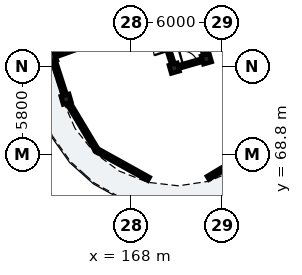
"""IFC4 building model, lengths in metres.
Left out: names, types, materials, properties, quantities, classifications, styles, units other than length and angle.
Written with IfcOpenShell. Run it as: python <this file> out.ifc"""

import sys

from ifc_helpers import new_model, si_unit, direction, frame, frame_2d, origin, origin_2d, place, context, subcontext, project, spatial, rectangle, extrude, element, fill, save


model = new_model("IFC4")
c1 = context("Model", 3, precision=1e-05, world=origin(), true_north=direction((0.0, 1.0)))
c2 = subcontext(c1, "Body", "Model", "MODEL_VIEW")
j1 = project(units=[si_unit("LENGTHUNIT", "METRE"), si_unit("PLANEANGLEUNIT", "RADIAN")], contexts=[c1])
p1 = place(None, origin())
s1 = spatial("IfcSite", under=j1, at=p1, CompositionType="ELEMENT")
p2 = place(p1, origin())
s2 = spatial("IfcBuilding", under=s1, at=p2, CompositionType="ELEMENT")
p3 = place(p2, frame((0.0, 0.0, 12.2)))
s3 = spatial("IfcBuildingStorey", under=s2, at=p3, CompositionType="ELEMENT", Elevation=12.2)
for number, where, z_axis, x_axis in (
    (1, (163.728, 72.452, 0.0), (0.0, 0.0, 1.0), (0.961, 0.276, 0.0)),
    (2, (170.841, 74.492, 0.0), (0.0, 0.0, 1.0), (0.961, 0.276, 0.0)),
    (3, (172.956, 75.098, 0.0), (0.0, 0.0, 1.0), (0.961, 0.276, 0.0)),
):
    element("IfcColumn", number, at=place(p3, frame(where, z_axis=z_axis, x_axis=x_axis)), inside=s3, PredefinedType="COLUMN", context=c2, shape_type="SweptSolid", body=[
        extrude(rectangle(XDim=0.55, YDim=0.55, at=origin_2d()), origin(), (0.0, 0.0, 1.0), 3.105),
    ])
p4 = place(p3, frame((162.828, 75.241, 0.0), z_axis=(0.0, 0.0, 1.0), x_axis=(0.941012076693, 0.338372976931, 0.0)))
e4 = element("IfcColumn", 4, at=p4, inside=s3, PredefinedType="PILASTER", context=c2, shape_type="SweptSolid", body=[
    extrude(rectangle(XDim=0.38, YDim=0.62, at=origin_2d()), origin(), (0.0, 0.0, 1.0), 3.105),
])
p5 = place(p3, frame((163.653, 72.685, 0.0), z_axis=(0.0, 0.0, 1.0), x_axis=(-0.30716379336, 0.951656662903, 0.0)))
e5 = element("IfcWall", 5, at=p5, inside=s3, PredefinedType="SOLIDWALL", context=c2, shape_type="SweptSolid", body=[
    extrude(rectangle(XDim=2.525, YDim=0.24, at=frame_2d((1.263, 0.0))), origin(), (0.0, 0.0, 1.0), 2.355),
])
p6 = place(p5, frame((0.673, 0.0, 0.55)))
e6 = element("IfcOpeningElement", 6, at=p6, cuts=e5, PredefinedType="OPENING", context=c2, shape_type="SweptSolid", body=[
    extrude(rectangle(XDim=1.18, YDim=1.48, at=frame_2d((0.59, 0.74))), frame((0.0, 0.13, 0.0), z_axis=(0.0, -1.0, 0.0), x_axis=(1.0, 0.0, 0.0)), (0.0, 0.0, 1.0), 0.26),
])
p7 = place(p3, frame((162.769, 75.389, 0.0), z_axis=(0.0, 0.0, 1.0), x_axis=(-0.369122600107, 0.92938071106, 0.0)))
e7 = element("IfcWall", 7, at=p7, inside=s3, PredefinedType="SOLIDWALL", context=c2, shape_type="SweptSolid", body=[
    extrude(rectangle(XDim=2.525, YDim=0.24, at=frame_2d((1.263, 0.0))), origin(), (0.0, 0.0, 1.0), 2.355),
])
p8 = place(p7, frame((0.523, 0.0, 0.55)))
e8 = element("IfcOpeningElement", 8, at=p8, cuts=e7, PredefinedType="OPENING", context=c2, shape_type="SweptSolid", body=[
    extrude(rectangle(XDim=1.48, YDim=1.62, at=frame_2d((0.74, 0.81))), frame((0.0, 0.13, 0.0), z_axis=(0.0, -1.0, 0.0), x_axis=(1.0, 0.0, 0.0)), (0.0, 0.0, 1.0), 0.26),
])
p9 = place(p3, frame((176.417, 69.289, 0.0), z_axis=(0.0, 0.0, 1.0), x_axis=(-0.85715098885, -0.515065221417, 0.0)))
e9 = element("IfcWall", 9, at=p9, inside=s3, PredefinedType="SOLIDWALL", context=c2, shape_type="SweptSolid", body=[
    extrude(rectangle(XDim=3.908, YDim=0.24, at=frame_2d((1.954, 0.0))), origin(), (0.0, 0.0, 1.0), 2.355),
])
p10 = place(p9, frame((1.029, 0.0, 0.4)))
e10 = element("IfcOpeningElement", 10, at=p10, cuts=e9, PredefinedType="OPENING", context=c2, shape_type="SweptSolid", body=[
    extrude(rectangle(XDim=1.85, YDim=1.72, at=frame_2d((0.925, 0.86))), frame((0.0, 0.13, 0.0), z_axis=(0.0, -1.0, 0.0), x_axis=(1.0, 0.0, 0.0)), (0.0, 0.0, 1.0), 0.26),
])
p11 = place(p3, frame((169.159, 67.208, 0.0), z_axis=(0.0, 0.0, 1.0), x_axis=(-0.874643043537, 0.484767517881, 0.0)))
e11 = element("IfcWall", 11, at=p11, inside=s3, PredefinedType="SOLIDWALL", context=c2, shape_type="SweptSolid", body=[
    extrude(rectangle(XDim=3.908, YDim=0.24, at=frame_2d((1.954, 0.0))), origin(), (0.0, 0.0, 1.0), 2.355),
])
p12 = place(p3, frame((165.741, 69.102, 0.0), z_axis=(0.0, 0.0, 1.0), x_axis=(-0.515037642827, 0.857167560324, 0.0)))
e12 = element("IfcWall", 12, at=p12, inside=s3, PredefinedType="SOLIDWALL", context=c2, shape_type="SweptSolid", body=[
    extrude(rectangle(XDim=3.908, YDim=0.24, at=frame_2d((1.954, 0.0))), origin(), (0.0, 0.0, 1.0), 2.355),
])
p13 = place(p12, frame((1.029, 0.0, 0.4)))
e13 = element("IfcOpeningElement", 13, at=p13, cuts=e12, PredefinedType="OPENING", context=c2, shape_type="SweptSolid", body=[
    extrude(rectangle(XDim=1.85, YDim=1.72, at=frame_2d((0.925, 0.86))), frame((0.0, 0.13, 0.0), z_axis=(0.0, -1.0, 0.0), x_axis=(1.0, 0.0, 0.0)), (0.0, 0.0, 1.0), 0.26),
])
p14 = place(p3, frame((172.849, 75.431, 0.0), z_axis=(0.0, 0.0, 1.0), x_axis=(-0.307157249761, 0.951658774939, 0.0)))
e14 = element("IfcWall", 14, at=p14, inside=s3, PredefinedType="PARTITIONING", context=c2, shape_type="SweptSolid", body=[
    extrude(rectangle(XDim=2.863, YDim=0.205, at=frame_2d((1.432, 0.0))), origin(), (0.0, 0.0, 1.0), 2.37),
])
p15 = place(p14, frame((0.937, 0.0, 0.0)))
e15 = element("IfcOpeningElement", 15, at=p15, cuts=e14, PredefinedType="OPENING", context=c2, shape_type="SweptSolid", body=[
    extrude(rectangle(XDim=0.99, YDim=2.16, at=frame_2d((0.495, 1.08))), frame((0.0, 0.113, 0.0), z_axis=(0.0, -1.0, 0.0), x_axis=(1.0, 0.0, 0.0)), (0.0, 0.0, 1.0), 0.225),
])
p16 = place(p3, frame((170.734, 74.825, 0.0), z_axis=(0.0, 0.0, 1.0), x_axis=(-0.307186478934, 0.95164934044, 0.0)))
e16 = element("IfcWall", 16, at=p16, inside=s3, PredefinedType="PARTITIONING", context=c2, shape_type="SweptSolid", body=[
    extrude(rectangle(XDim=2.718, YDim=0.205, at=frame_2d((1.359, 0.0))), origin(), (0.0, 0.0, 1.0), 2.37),
])
p17 = place(p16, frame((0.864, 0.0, 0.0)))
e17 = element("IfcOpeningElement", 17, at=p17, cuts=e16, PredefinedType="OPENING", context=c2, shape_type="SweptSolid", body=[
    extrude(rectangle(XDim=0.99, YDim=2.16, at=frame_2d((0.495, 1.08))), frame((0.0, 0.113, 0.0), z_axis=(0.0, -1.0, 0.0), x_axis=(1.0, 0.0, 0.0)), (0.0, 0.0, 1.0), 0.225),
])
p18 = place(p3, frame((163.204, 75.376, 0.0), z_axis=(0.0, 0.0, 1.0), x_axis=(0.941005714099, 0.338390670725, 0.0)))
e18 = element("IfcWall", 18, at=p18, inside=s3, PredefinedType="PARTITIONING", context=c2, shape_type="SweptSolid", body=[
    extrude(rectangle(XDim=6.6, YDim=0.185, at=frame_2d((3.3, 0.0))), origin(), (0.0, 0.0, 1.0), 2.37),
])
p19 = place(p3, frame((170.889, 74.506, 0.0), z_axis=(0.0, 0.0, 1.0), x_axis=(0.961264701934, 0.275626872449, 0.0)))
e19 = element("IfcWall", 19, at=p19, inside=s3, PredefinedType="PARTITIONING", context=c2, shape_type="SweptSolid", body=[
    extrude(rectangle(XDim=2.1, YDim=0.205, at=frame_2d((1.05, 0.0))), origin(), (0.0, 0.0, 1.0), 2.37),
])
p20 = place(p19, frame((0.57, 0.0, 0.0)))
e20 = element("IfcOpeningElement", 20, at=p20, cuts=e19, PredefinedType="OPENING", context=c2, shape_type="SweptSolid", body=[
    extrude(rectangle(XDim=0.95, YDim=2.13, at=frame_2d((0.475, 1.065))), frame((0.0, 0.113, 0.0), z_axis=(0.0, -1.0, 0.0), x_axis=(1.0, 0.0, 0.0)), (0.0, 0.0, 1.0), 0.225),
])
p21 = place(p6, origin())
e21 = element("IfcWindow", 21, at=p21, inside=s3, PartitioningType="SINGLE_PANEL", PredefinedType="WINDOW", context=c2, shape_type="SweptSolid", body=[
    extrude(rectangle(XDim=1.18, YDim=1.48, at=frame_2d((0.59, 0.74))), frame((0.0, 0.03, 0.0), z_axis=(0.0, -1.0, 0.0), x_axis=(1.0, 0.0, 0.0)), (0.0, 0.0, 1.0), 0.06),
])
fill(e6, e21)
p22 = place(p10, origin())
e22 = element("IfcWindow", 22, at=p22, inside=s3, PartitioningType="SINGLE_PANEL", PredefinedType="WINDOW", context=c2, shape_type="SweptSolid", body=[
    extrude(rectangle(XDim=1.85, YDim=1.72, at=frame_2d((0.925, 0.86))), frame((0.0, 0.03, 0.0), z_axis=(0.0, -1.0, 0.0), x_axis=(1.0, 0.0, 0.0)), (0.0, 0.0, 1.0), 0.06),
])
fill(e10, e22)
p23 = place(p13, origin())
e23 = element("IfcWindow", 23, at=p23, inside=s3, PartitioningType="SINGLE_PANEL", PredefinedType="WINDOW", context=c2, shape_type="SweptSolid", body=[
    extrude(rectangle(XDim=1.85, YDim=1.72, at=frame_2d((0.925, 0.86))), frame((0.0, 0.03, 0.0), z_axis=(0.0, -1.0, 0.0), x_axis=(1.0, 0.0, 0.0)), (0.0, 0.0, 1.0), 0.06),
])
fill(e13, e23)
p24 = place(p20, origin())
e24 = element("IfcDoor", 24, at=p24, inside=s3, OperationType="SINGLE_SWING_LEFT", PredefinedType="DOOR", context=c2, shape_type="SweptSolid", body=[
    extrude(rectangle(XDim=0.95, YDim=2.13, at=frame_2d((0.475, 1.065))), frame((0.0, 0.025, 0.0), z_axis=(0.0, -1.0, 0.0), x_axis=(1.0, 0.0, 0.0)), (0.0, 0.0, 1.0), 0.05),
])
fill(e20, e24)
save(model, sys.argv[1])
